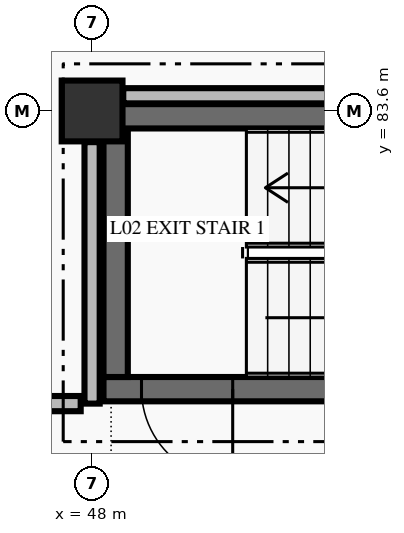
"""IFC4 building model, lengths in metres.
Left out: names, types, materials, properties, quantities, classifications, styles, units other than length and angle.
Written with IfcOpenShell. Run it as: python <this file> out.ifc"""

import sys

from ifc_helpers import new_model, si_unit, direction, frame, frame_2d, origin, origin_2d, place, context, subcontext, project, spatial, rectangle, extrude, element, fill, save


model = new_model("IFC4")
c1 = context("Model", 3, precision=1e-05, world=origin(), true_north=direction((0.0, 1.0)))
c2 = subcontext(c1, "Body", "Model", "MODEL_VIEW")
j1 = project(units=[si_unit("LENGTHUNIT", "METRE"), si_unit("PLANEANGLEUNIT", "RADIAN")], contexts=[c1])
p1 = place(None, origin())
s1 = spatial("IfcSite", under=j1, at=p1, CompositionType="ELEMENT")
p2 = place(p1, origin())
s2 = spatial("IfcBuilding", under=s1, at=p2, CompositionType="ELEMENT")
p3 = place(p2, frame((0.0, 0.0, 5.4)))
s3 = spatial("IfcBuildingStorey", under=s2, at=p3, CompositionType="ELEMENT", Elevation=5.4)
p4 = place(p3, frame((48.0, 83.6, 0.0), z_axis=(0.0, 0.0, 1.0), x_axis=(1.0, 0.0, 0.0)))
e1 = element("IfcColumn", 1, at=p4, inside=s3, PredefinedType="COLUMN", context=c2, shape_type="SweptSolid", body=[
    extrude(rectangle(XDim=0.8, YDim=0.8, at=origin_2d()), origin(), (0.0, 0.0, 1.0), 4.8),
])
p5 = place(p3, frame((55.85, 79.94, 0.0), z_axis=(0.0, 0.0, 1.0), x_axis=(-1.0, 0.0, 0.0)))
e2 = element("IfcWall", 2, at=p5, inside=s3, PredefinedType="SHEAR", context=c2, shape_type="SweptSolid", body=[
    extrude(rectangle(XDim=7.7, YDim=0.32, at=frame_2d((3.85, 0.0))), origin(), (0.0, 0.0, 1.0), 4.8),
])
p6 = place(p5, frame((6.0, 0.0, 0.0)))
e3 = element("IfcOpeningElement", 3, at=p6, cuts=e2, PredefinedType="OPENING", context=c2, shape_type="SweptSolid", body=[
    extrude(rectangle(XDim=1.2, YDim=2.2, at=frame_2d((0.6, 1.1))), frame((0.0, 0.17, 0.0), z_axis=(0.0, -1.0, 0.0), x_axis=(1.0, 0.0, 0.0)), (0.0, 0.0, 1.0), 0.34),
])
p7 = place(p3, frame((48.31, 80.1, 0.0), z_axis=(0.0, 0.0, 1.0), x_axis=(0.0, 1.0, 0.0)))
e4 = element("IfcWall", 4, at=p7, inside=s3, PredefinedType="SHEAR", context=c2, shape_type="SweptSolid", body=[
    extrude(rectangle(XDim=3.27, YDim=0.32, at=frame_2d((1.635, 0.0))), origin(), (0.0, 0.0, 1.0), 4.8),
])
p8 = place(p3, frame((48.15, 83.53, 0.0), z_axis=(0.0, 0.0, 1.0), x_axis=(1.0, 0.0, 0.0)))
e5 = element("IfcWall", 5, at=p8, inside=s3, PredefinedType="SHEAR", context=c2, shape_type="SweptSolid", body=[
    extrude(rectangle(XDim=7.7, YDim=0.32, at=frame_2d((3.85, 0.0))), origin(), (0.0, 0.0, 1.0), 4.8),
])
p9 = place(p3, frame((48.0, 79.75, 0.0), z_axis=(0.0, 0.0, 1.0), x_axis=(0.0, 1.0, 0.0)))
e6 = element("IfcWall", 6, at=p9, inside=s3, PredefinedType="STANDARD", context=c2, shape_type="SweptSolid", body=[
    extrude(rectangle(XDim=3.44, YDim=0.2, at=frame_2d((1.72, 0.0))), origin(), (0.0, 0.0, 1.0), 3.84),
])
p10 = place(p3, frame((48.41, 83.8, 0.0), z_axis=(0.0, 0.0, 1.0), x_axis=(1.0, 0.0, 0.0)))
e7 = element("IfcWall", 7, at=p10, inside=s3, PredefinedType="STANDARD", context=c2, shape_type="SweptSolid", body=[
    extrude(rectangle(XDim=7.18, YDim=0.2, at=frame_2d((3.59, 0.0))), origin(), (0.0, 0.0, 1.0), 3.89),
])
p11 = place(p3, frame((47.85, 79.75, 0.0), z_axis=(0.0, 0.0, 1.0), x_axis=(-1.0, 0.0, 0.0)))
e8 = element("IfcWall", 8, at=p11, inside=s3, PredefinedType="STANDARD", context=c2, shape_type="SweptSolid", body=[
    extrude(rectangle(XDim=28.195, YDim=0.2, at=frame_2d((14.098, 0.0))), origin(), (0.0, 0.0, 1.0), 4.54),
])
p12 = place(p11, frame((13.573, 0.0, 0.0)))
e9 = element("IfcOpeningElement", 9, at=p12, cuts=e8, PredefinedType="OPENING", context=c2, shape_type="SweptSolid", body=[
    extrude(rectangle(XDim=1.05, YDim=2.15, at=frame_2d((0.525, 1.075))), frame((0.0, 0.11, 0.0), z_axis=(0.0, -1.0, 0.0), x_axis=(1.0, 0.0, 0.0)), (0.0, 0.0, 1.0), 0.22),
])
p13 = place(p6, origin())
e10 = element("IfcDoor", 10, at=p13, inside=s3, OperationType="SINGLE_SWING_LEFT", PredefinedType="DOOR", context=c2, shape_type="SweptSolid", body=[
    extrude(rectangle(XDim=1.2, YDim=2.2, at=frame_2d((0.6, 1.1))), frame((0.0, 0.025, 0.0), z_axis=(0.0, -1.0, 0.0), x_axis=(1.0, 0.0, 0.0)), (0.0, 0.0, 1.0), 0.05),
])
fill(e3, e10)
save(model, sys.argv[1])
